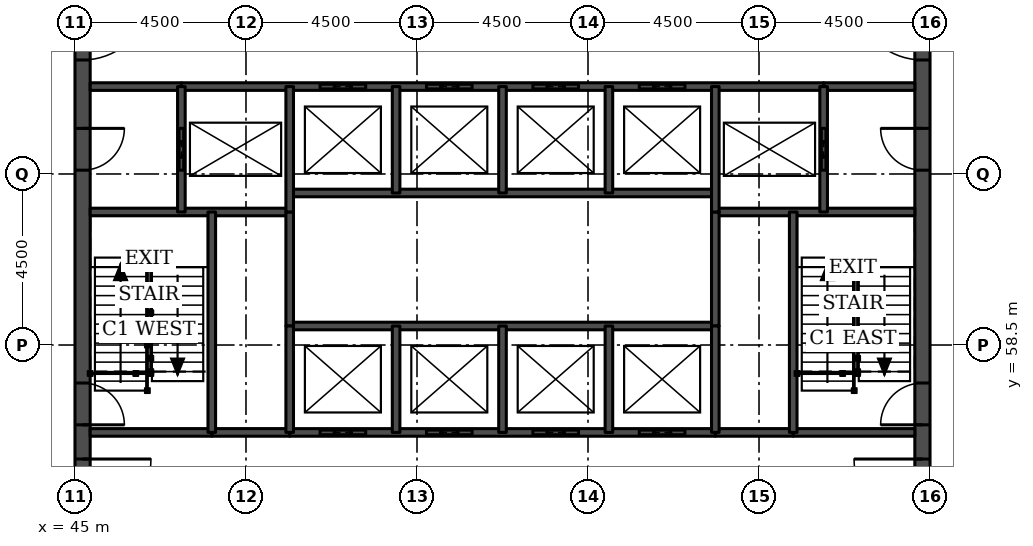
"""IFC4 building model, lengths in metres.
Left out: names, types, materials, properties, quantities, classifications, styles, units other than length and angle.
Written with IfcOpenShell. Run it as: python <this file> out.ifc"""

import sys

from ifc_helpers import new_model, si_unit, direction, frame, frame_2d, origin, place, context, subcontext, project, spatial, rectangle, extrude, element, fill, save


model = new_model("IFC4")
c1 = context("Model", 3, precision=1e-05, world=origin(), true_north=direction((0.0, 1.0)))
c2 = subcontext(c1, "Body", "Model", "MODEL_VIEW")
j1 = project(units=[si_unit("LENGTHUNIT", "METRE"), si_unit("PLANEANGLEUNIT", "RADIAN")], contexts=[c1])
p1 = place(None, origin())
s1 = spatial("IfcSite", under=j1, at=p1, CompositionType="ELEMENT")
p2 = place(p1, origin())
s2 = spatial("IfcBuilding", under=s1, at=p2, CompositionType="ELEMENT")
p3 = place(p2, frame((0.0, 0.0, 248.9)))
s3 = spatial("IfcBuildingStorey", under=s2, at=p3, CompositionType="ELEMENT", Elevation=248.9)
p4 = place(p3, frame((45.2, 49.5, 0.0), z_axis=(0.0, 0.0, 1.0), x_axis=(0.0, 1.0, 0.0)))
e1 = element("IfcWall", 1, at=p4, inside=s3, PredefinedType="SHEAR", context=c2, shape_type="SweptSolid", body=[
    extrude(rectangle(XDim=22.5, YDim=0.4, at=frame_2d((11.25, 0.0))), origin(), (0.0, 0.0, 1.0), 3.7),
])
p5 = place(p4, frame((4.2, 0.0, 0.0)))
e2 = element("IfcOpeningElement", 2, at=p5, cuts=e1, PredefinedType="OPENING", context=c2, shape_type="SweptSolid", body=[
    extrude(rectangle(XDim=1.8, YDim=2.1, at=frame_2d((0.9, 1.05))), frame((0.0, 0.21, 0.0), z_axis=(0.0, -1.0, 0.0), x_axis=(1.0, 0.0, 0.0)), (0.0, 0.0, 1.0), 0.42),
])
p6 = place(p4, frame((6.9, 0.0, 0.0)))
e3 = element("IfcOpeningElement", 3, at=p6, cuts=e1, PredefinedType="OPENING", context=c2, shape_type="SweptSolid", body=[
    extrude(rectangle(XDim=1.1, YDim=2.1, at=frame_2d((0.55, 1.05))), frame((0.0, 0.21, 0.0), z_axis=(0.0, -1.0, 0.0), x_axis=(1.0, 0.0, 0.0)), (0.0, 0.0, 1.0), 0.42),
])
p7 = place(p4, frame((13.6, 0.0, 0.0)))
e4 = element("IfcOpeningElement", 4, at=p7, cuts=e1, PredefinedType="OPENING", context=c2, shape_type="SweptSolid", body=[
    extrude(rectangle(XDim=1.1, YDim=2.1, at=frame_2d((0.55, 1.05))), frame((0.0, 0.21, 0.0), z_axis=(0.0, -1.0, 0.0), x_axis=(1.0, 0.0, 0.0)), (0.0, 0.0, 1.0), 0.42),
])
p8 = place(p4, frame((16.5, 0.0, 0.0)))
e5 = element("IfcOpeningElement", 5, at=p8, cuts=e1, PredefinedType="OPENING", context=c2, shape_type="SweptSolid", body=[
    extrude(rectangle(XDim=1.8, YDim=2.1, at=frame_2d((0.9, 1.05))), frame((0.0, 0.21, 0.0), z_axis=(0.0, -1.0, 0.0), x_axis=(1.0, 0.0, 0.0)), (0.0, 0.0, 1.0), 0.42),
])
p9 = place(p3, frame((67.3, 49.5, 0.0), z_axis=(0.0, 0.0, 1.0), x_axis=(0.0, 1.0, 0.0)))
e6 = element("IfcWall", 6, at=p9, inside=s3, PredefinedType="SHEAR", context=c2, shape_type="SweptSolid", body=[
    extrude(rectangle(XDim=22.5, YDim=0.4, at=frame_2d((11.25, 0.0))), origin(), (0.0, 0.0, 1.0), 3.7),
])
p10 = place(p9, frame((4.2, 0.0, 0.0)))
e7 = element("IfcOpeningElement", 7, at=p10, cuts=e6, PredefinedType="OPENING", context=c2, shape_type="SweptSolid", body=[
    extrude(rectangle(XDim=1.8, YDim=2.1, at=frame_2d((0.9, 1.05))), frame((0.0, 0.21, 0.0), z_axis=(0.0, -1.0, 0.0), x_axis=(1.0, 0.0, 0.0)), (0.0, 0.0, 1.0), 0.42),
])
p11 = place(p9, frame((6.9, 0.0, 0.0)))
e8 = element("IfcOpeningElement", 8, at=p11, cuts=e6, PredefinedType="OPENING", context=c2, shape_type="SweptSolid", body=[
    extrude(rectangle(XDim=1.1, YDim=2.1, at=frame_2d((0.55, 1.05))), frame((0.0, 0.21, 0.0), z_axis=(0.0, -1.0, 0.0), x_axis=(1.0, 0.0, 0.0)), (0.0, 0.0, 1.0), 0.42),
])
p12 = place(p9, frame((13.6, 0.0, 0.0)))
e9 = element("IfcOpeningElement", 9, at=p12, cuts=e6, PredefinedType="OPENING", context=c2, shape_type="SweptSolid", body=[
    extrude(rectangle(XDim=1.1, YDim=2.1, at=frame_2d((0.55, 1.05))), frame((0.0, 0.21, 0.0), z_axis=(0.0, -1.0, 0.0), x_axis=(1.0, 0.0, 0.0)), (0.0, 0.0, 1.0), 0.42),
])
p13 = place(p9, frame((16.5, 0.0, 0.0)))
e10 = element("IfcOpeningElement", 10, at=p13, cuts=e6, PredefinedType="OPENING", context=c2, shape_type="SweptSolid", body=[
    extrude(rectangle(XDim=1.8, YDim=2.1, at=frame_2d((0.9, 1.05))), frame((0.0, 0.21, 0.0), z_axis=(0.0, -1.0, 0.0), x_axis=(1.0, 0.0, 0.0)), (0.0, 0.0, 1.0), 0.42),
])
for number, where, z_axis, x_axis in (
    (11, (48.6, 56.2, 0.0), (0.0, 0.0, 1.0), (1.0, 0.0, 0.0)),
    (12, (61.85, 56.2, 0.0), (0.0, 0.0, 1.0), (1.0, 0.0, 0.0)),
):
    element("IfcWall", number, at=place(p3, frame(where, z_axis=z_axis, x_axis=x_axis)), inside=s3, PredefinedType="SOLIDWALL", context=c2, shape_type="SweptSolid", body=[
        extrude(rectangle(XDim=2.05, YDim=0.2, at=frame_2d((1.025, 0.0))), origin(), (0.0, 0.0, 1.0), 3.55),
    ])
p14 = place(p3, frame((45.4, 56.2, 0.0), z_axis=(0.0, 0.0, 1.0), x_axis=(1.0, 0.0, 0.0)))
e13 = element("IfcWall", 13, at=p14, inside=s3, PredefinedType="SOLIDWALL", context=c2, shape_type="SweptSolid", body=[
    extrude(rectangle(XDim=3.2, YDim=0.2, at=frame_2d((1.6, 0.0))), origin(), (0.0, 0.0, 1.0), 3.55),
])
p15 = place(p3, frame((50.65, 56.2, 0.0), z_axis=(0.0, 0.0, 1.0), x_axis=(1.0, 0.0, 0.0)))
e14 = element("IfcWall", 14, at=p15, inside=s3, PredefinedType="SOLIDWALL", context=c2, shape_type="SweptSolid", body=[
    extrude(rectangle(XDim=11.2, YDim=0.2, at=frame_2d((5.6, 0.0))), origin(), (0.0, 0.0, 1.0), 3.55),
])
p16 = place(p15, frame((0.8, 0.0, 0.0)))
e15 = element("IfcOpeningElement", 15, at=p16, cuts=e14, PredefinedType="OPENING", context=c2, shape_type="SweptSolid", body=[
    extrude(rectangle(XDim=1.2, YDim=2.1, at=frame_2d((0.6, 1.05))), frame((0.0, 0.11, 0.0), z_axis=(0.0, -1.0, 0.0), x_axis=(1.0, 0.0, 0.0)), (0.0, 0.0, 1.0), 0.22),
])
p17 = place(p15, frame((3.6, 0.0, 0.0)))
e16 = element("IfcOpeningElement", 16, at=p17, cuts=e14, PredefinedType="OPENING", context=c2, shape_type="SweptSolid", body=[
    extrude(rectangle(XDim=1.2, YDim=2.1, at=frame_2d((0.6, 1.05))), frame((0.0, 0.11, 0.0), z_axis=(0.0, -1.0, 0.0), x_axis=(1.0, 0.0, 0.0)), (0.0, 0.0, 1.0), 0.22),
])
p18 = place(p15, frame((6.4, 0.0, 0.0)))
e17 = element("IfcOpeningElement", 17, at=p18, cuts=e14, PredefinedType="OPENING", context=c2, shape_type="SweptSolid", body=[
    extrude(rectangle(XDim=1.2, YDim=2.1, at=frame_2d((0.6, 1.05))), frame((0.0, 0.11, 0.0), z_axis=(0.0, -1.0, 0.0), x_axis=(1.0, 0.0, 0.0)), (0.0, 0.0, 1.0), 0.22),
])
p19 = place(p15, frame((9.2, 0.0, 0.0)))
e18 = element("IfcOpeningElement", 18, at=p19, cuts=e14, PredefinedType="OPENING", context=c2, shape_type="SweptSolid", body=[
    extrude(rectangle(XDim=1.2, YDim=2.1, at=frame_2d((0.6, 1.05))), frame((0.0, 0.11, 0.0), z_axis=(0.0, -1.0, 0.0), x_axis=(1.0, 0.0, 0.0)), (0.0, 0.0, 1.0), 0.22),
])
p20 = place(p3, frame((63.9, 56.2, 0.0), z_axis=(0.0, 0.0, 1.0), x_axis=(1.0, 0.0, 0.0)))
e19 = element("IfcWall", 19, at=p20, inside=s3, PredefinedType="SOLIDWALL", context=c2, shape_type="SweptSolid", body=[
    extrude(rectangle(XDim=3.2, YDim=0.2, at=frame_2d((1.6, 0.0))), origin(), (0.0, 0.0, 1.0), 3.55),
])
p21 = place(p3, frame((50.65, 59.0, 0.0), z_axis=(0.0, 0.0, 1.0), x_axis=(1.0, 0.0, 0.0)))
e20 = element("IfcWall", 20, at=p21, inside=s3, PredefinedType="SOLIDWALL", context=c2, shape_type="SweptSolid", body=[
    extrude(rectangle(XDim=11.2, YDim=0.2, at=frame_2d((5.6, 0.0))), origin(), (0.0, 0.0, 1.0), 3.7),
])
for number, where, z_axis, x_axis in (
    (21, (45.4, 62.0, 0.0), (0.0, 0.0, 1.0), (1.0, 0.0, 0.0)),
    (22, (61.85, 62.0, 0.0), (0.0, 0.0, 1.0), (1.0, 0.0, 0.0)),
):
    element("IfcWall", number, at=place(p3, frame(where, z_axis=z_axis, x_axis=x_axis)), inside=s3, PredefinedType="SOLIDWALL", context=c2, shape_type="SweptSolid", body=[
        extrude(rectangle(XDim=5.25, YDim=0.2, at=frame_2d((2.625, 0.0))), origin(), (0.0, 0.0, 1.0), 3.55),
    ])
p22 = place(p3, frame((50.65, 62.5, 0.0), z_axis=(0.0, 0.0, 1.0), x_axis=(1.0, 0.0, 0.0)))
e23 = element("IfcWall", 23, at=p22, inside=s3, PredefinedType="SOLIDWALL", context=c2, shape_type="SweptSolid", body=[
    extrude(rectangle(XDim=11.2, YDim=0.2, at=frame_2d((5.6, 0.0))), origin(), (0.0, 0.0, 1.0), 3.7),
])
for number, where, z_axis, x_axis in (
    (24, (45.4, 65.3, 0.0), (0.0, 0.0, 1.0), (1.0, 0.0, 0.0)),
    (25, (64.7, 65.3, 0.0), (0.0, 0.0, 1.0), (1.0, 0.0, 0.0)),
):
    element("IfcWall", number, at=place(p3, frame(where, z_axis=z_axis, x_axis=x_axis)), inside=s3, PredefinedType="SOLIDWALL", context=c2, shape_type="SweptSolid", body=[
        extrude(rectangle(XDim=2.4, YDim=0.2, at=frame_2d((1.2, 0.0))), origin(), (0.0, 0.0, 1.0), 3.55),
    ])
p23 = place(p3, frame((47.8, 65.3, 0.0), z_axis=(0.0, 0.0, 1.0), x_axis=(1.0, 0.0, 0.0)))
e26 = element("IfcWall", 26, at=p23, inside=s3, PredefinedType="SOLIDWALL", context=c2, shape_type="SweptSolid", body=[
    extrude(rectangle(XDim=16.9, YDim=0.2, at=frame_2d((8.45, 0.0))), origin(), (0.0, 0.0, 1.0), 3.55),
])
p24 = place(p23, frame((3.65, 0.0, 0.0)))
e27 = element("IfcOpeningElement", 27, at=p24, cuts=e26, PredefinedType="OPENING", context=c2, shape_type="SweptSolid", body=[
    extrude(rectangle(XDim=1.2, YDim=2.1, at=frame_2d((0.6, 1.05))), frame((0.0, 0.11, 0.0), z_axis=(0.0, -1.0, 0.0), x_axis=(1.0, 0.0, 0.0)), (0.0, 0.0, 1.0), 0.22),
])
p25 = place(p23, frame((6.45, 0.0, 0.0)))
e28 = element("IfcOpeningElement", 28, at=p25, cuts=e26, PredefinedType="OPENING", context=c2, shape_type="SweptSolid", body=[
    extrude(rectangle(XDim=1.2, YDim=2.1, at=frame_2d((0.6, 1.05))), frame((0.0, 0.11, 0.0), z_axis=(0.0, -1.0, 0.0), x_axis=(1.0, 0.0, 0.0)), (0.0, 0.0, 1.0), 0.22),
])
p26 = place(p23, frame((9.25, 0.0, 0.0)))
e29 = element("IfcOpeningElement", 29, at=p26, cuts=e26, PredefinedType="OPENING", context=c2, shape_type="SweptSolid", body=[
    extrude(rectangle(XDim=1.2, YDim=2.1, at=frame_2d((0.6, 1.05))), frame((0.0, 0.11, 0.0), z_axis=(0.0, -1.0, 0.0), x_axis=(1.0, 0.0, 0.0)), (0.0, 0.0, 1.0), 0.22),
])
p27 = place(p23, frame((12.05, 0.0, 0.0)))
e30 = element("IfcOpeningElement", 30, at=p27, cuts=e26, PredefinedType="OPENING", context=c2, shape_type="SweptSolid", body=[
    extrude(rectangle(XDim=1.2, YDim=2.1, at=frame_2d((0.6, 1.05))), frame((0.0, 0.11, 0.0), z_axis=(0.0, -1.0, 0.0), x_axis=(1.0, 0.0, 0.0)), (0.0, 0.0, 1.0), 0.22),
])
p28 = place(p3, frame((47.8, 62.0, 0.0), z_axis=(0.0, 0.0, 1.0), x_axis=(0.0, 1.0, 0.0)))
e31 = element("IfcWall", 31, at=p28, inside=s3, PredefinedType="SOLIDWALL", context=c2, shape_type="SweptSolid", body=[
    extrude(rectangle(XDim=3.3, YDim=0.2, at=frame_2d((1.65, 0.0))), origin(), (0.0, 0.0, 1.0), 3.55),
])
p29 = place(p28, frame((1.1, 0.0, 0.0)))
e32 = element("IfcOpeningElement", 32, at=p29, cuts=e31, PredefinedType="OPENING", context=c2, shape_type="SweptSolid", body=[
    extrude(rectangle(XDim=1.1, YDim=2.1, at=frame_2d((0.55, 1.05))), frame((0.0, 0.11, 0.0), z_axis=(0.0, -1.0, 0.0), x_axis=(1.0, 0.0, 0.0)), (0.0, 0.0, 1.0), 0.22),
])
p30 = place(p3, frame((48.6, 56.2, 0.0), z_axis=(0.0, 0.0, 1.0), x_axis=(0.0, 1.0, 0.0)))
e33 = element("IfcWall", 33, at=p30, inside=s3, PredefinedType="SOLIDWALL", context=c2, shape_type="SweptSolid", body=[
    extrude(rectangle(XDim=5.8, YDim=0.2, at=frame_2d((2.9, 0.0))), origin(), (0.0, 0.0, 1.0), 3.55),
])
p31 = place(p3, frame((50.65, 59.0, 0.0), z_axis=(0.0, 0.0, 1.0), x_axis=(0.0, 1.0, 0.0)))
e34 = element("IfcWall", 34, at=p31, inside=s3, PredefinedType="SOLIDWALL", context=c2, shape_type="SweptSolid", body=[
    extrude(rectangle(XDim=3.0, YDim=0.2, at=frame_2d((1.5, 0.0))), origin(), (0.0, 0.0, 1.0), 3.7),
])
p32 = place(p3, frame((50.65, 56.2, 0.0), z_axis=(0.0, 0.0, 1.0), x_axis=(0.0, 1.0, 0.0)))
e35 = element("IfcWall", 35, at=p32, inside=s3, PredefinedType="SOLIDWALL", context=c2, shape_type="SweptSolid", body=[
    extrude(rectangle(XDim=2.8, YDim=0.2, at=frame_2d((1.4, 0.0))), origin(), (0.0, 0.0, 1.0), 3.55),
])
p33 = place(p3, frame((50.65, 62.0, 0.0), z_axis=(0.0, 0.0, 1.0), x_axis=(0.0, 1.0, 0.0)))
e36 = element("IfcWall", 36, at=p33, inside=s3, PredefinedType="SOLIDWALL", context=c2, shape_type="SweptSolid", body=[
    extrude(rectangle(XDim=3.3, YDim=0.2, at=frame_2d((1.65, 0.0))), origin(), (0.0, 0.0, 1.0), 3.55),
])
for number, where, z_axis, x_axis in (
    (37, (53.45, 56.2, 0.0), (0.0, 0.0, 1.0), (0.0, 1.0, 0.0)),
    (38, (53.45, 62.5, 0.0), (0.0, 0.0, 1.0), (0.0, 1.0, 0.0)),
    (39, (56.25, 56.2, 0.0), (0.0, 0.0, 1.0), (0.0, 1.0, 0.0)),
    (40, (56.25, 62.5, 0.0), (0.0, 0.0, 1.0), (0.0, 1.0, 0.0)),
    (41, (59.05, 56.2, 0.0), (0.0, 0.0, 1.0), (0.0, 1.0, 0.0)),
    (42, (59.05, 62.5, 0.0), (0.0, 0.0, 1.0), (0.0, 1.0, 0.0)),
):
    element("IfcWall", number, at=place(p3, frame(where, z_axis=z_axis, x_axis=x_axis)), inside=s3, PredefinedType="SOLIDWALL", context=c2, shape_type="SweptSolid", body=[
        extrude(rectangle(XDim=2.8, YDim=0.2, at=frame_2d((1.4, 0.0))), origin(), (0.0, 0.0, 1.0), 3.55),
    ])
p34 = place(p3, frame((61.85, 59.0, 0.0), z_axis=(0.0, 0.0, 1.0), x_axis=(0.0, 1.0, 0.0)))
e43 = element("IfcWall", 43, at=p34, inside=s3, PredefinedType="SOLIDWALL", context=c2, shape_type="SweptSolid", body=[
    extrude(rectangle(XDim=3.0, YDim=0.2, at=frame_2d((1.5, 0.0))), origin(), (0.0, 0.0, 1.0), 3.7),
])
p35 = place(p3, frame((61.85, 56.2, 0.0), z_axis=(0.0, 0.0, 1.0), x_axis=(0.0, 1.0, 0.0)))
e44 = element("IfcWall", 44, at=p35, inside=s3, PredefinedType="SOLIDWALL", context=c2, shape_type="SweptSolid", body=[
    extrude(rectangle(XDim=2.8, YDim=0.2, at=frame_2d((1.4, 0.0))), origin(), (0.0, 0.0, 1.0), 3.55),
])
p36 = place(p3, frame((61.85, 62.0, 0.0), z_axis=(0.0, 0.0, 1.0), x_axis=(0.0, 1.0, 0.0)))
e45 = element("IfcWall", 45, at=p36, inside=s3, PredefinedType="SOLIDWALL", context=c2, shape_type="SweptSolid", body=[
    extrude(rectangle(XDim=3.3, YDim=0.2, at=frame_2d((1.65, 0.0))), origin(), (0.0, 0.0, 1.0), 3.55),
])
p37 = place(p3, frame((63.9, 56.2, 0.0), z_axis=(0.0, 0.0, 1.0), x_axis=(0.0, 1.0, 0.0)))
e46 = element("IfcWall", 46, at=p37, inside=s3, PredefinedType="SOLIDWALL", context=c2, shape_type="SweptSolid", body=[
    extrude(rectangle(XDim=5.8, YDim=0.2, at=frame_2d((2.9, 0.0))), origin(), (0.0, 0.0, 1.0), 3.55),
])
p38 = place(p3, frame((64.7, 62.0, 0.0), z_axis=(0.0, 0.0, 1.0), x_axis=(0.0, 1.0, 0.0)))
e47 = element("IfcWall", 47, at=p38, inside=s3, PredefinedType="SOLIDWALL", context=c2, shape_type="SweptSolid", body=[
    extrude(rectangle(XDim=3.3, YDim=0.2, at=frame_2d((1.65, 0.0))), origin(), (0.0, 0.0, 1.0), 3.55),
])
p39 = place(p38, frame((1.1, 0.0, 0.0)))
e48 = element("IfcOpeningElement", 48, at=p39, cuts=e47, PredefinedType="OPENING", context=c2, shape_type="SweptSolid", body=[
    extrude(rectangle(XDim=1.1, YDim=2.1, at=frame_2d((0.55, 1.05))), frame((0.0, 0.11, 0.0), z_axis=(0.0, -1.0, 0.0), x_axis=(1.0, 0.0, 0.0)), (0.0, 0.0, 1.0), 0.22),
])
p40 = place(p16, origin())
e49 = element("IfcDoor", 49, at=p40, inside=s3, OperationType="DOUBLE_DOOR_SLIDING", PredefinedType="DOOR", context=c2, shape_type="SweptSolid", body=[
    extrude(rectangle(XDim=1.2, YDim=2.1, at=frame_2d((0.6, 1.05))), frame((0.0, 0.025, 0.0), z_axis=(0.0, -1.0, 0.0), x_axis=(1.0, 0.0, 0.0)), (0.0, 0.0, 1.0), 0.05),
])
fill(e15, e49)
p41 = place(p17, origin())
e50 = element("IfcDoor", 50, at=p41, inside=s3, OperationType="DOUBLE_DOOR_SLIDING", PredefinedType="DOOR", context=c2, shape_type="SweptSolid", body=[
    extrude(rectangle(XDim=1.2, YDim=2.1, at=frame_2d((0.6, 1.05))), frame((0.0, 0.025, 0.0), z_axis=(0.0, -1.0, 0.0), x_axis=(1.0, 0.0, 0.0)), (0.0, 0.0, 1.0), 0.05),
])
fill(e16, e50)
p42 = place(p18, origin())
e51 = element("IfcDoor", 51, at=p42, inside=s3, OperationType="DOUBLE_DOOR_SLIDING", PredefinedType="DOOR", context=c2, shape_type="SweptSolid", body=[
    extrude(rectangle(XDim=1.2, YDim=2.1, at=frame_2d((0.6, 1.05))), frame((0.0, 0.025, 0.0), z_axis=(0.0, -1.0, 0.0), x_axis=(1.0, 0.0, 0.0)), (0.0, 0.0, 1.0), 0.05),
])
fill(e17, e51)
p43 = place(p19, origin())
e52 = element("IfcDoor", 52, at=p43, inside=s3, OperationType="DOUBLE_DOOR_SLIDING", PredefinedType="DOOR", context=c2, shape_type="SweptSolid", body=[
    extrude(rectangle(XDim=1.2, YDim=2.1, at=frame_2d((0.6, 1.05))), frame((0.0, 0.025, 0.0), z_axis=(0.0, -1.0, 0.0), x_axis=(1.0, 0.0, 0.0)), (0.0, 0.0, 1.0), 0.05),
])
fill(e18, e52)
p44 = place(p24, origin())
e53 = element("IfcDoor", 53, at=p44, inside=s3, OperationType="DOUBLE_DOOR_SLIDING", PredefinedType="DOOR", context=c2, shape_type="SweptSolid", body=[
    extrude(rectangle(XDim=1.2, YDim=2.1, at=frame_2d((0.6, 1.05))), frame((0.0, 0.025, 0.0), z_axis=(0.0, -1.0, 0.0), x_axis=(1.0, 0.0, 0.0)), (0.0, 0.0, 1.0), 0.05),
])
fill(e27, e53)
p45 = place(p25, origin())
e54 = element("IfcDoor", 54, at=p45, inside=s3, OperationType="DOUBLE_DOOR_SLIDING", PredefinedType="DOOR", context=c2, shape_type="SweptSolid", body=[
    extrude(rectangle(XDim=1.2, YDim=2.1, at=frame_2d((0.6, 1.05))), frame((0.0, 0.025, 0.0), z_axis=(0.0, -1.0, 0.0), x_axis=(1.0, 0.0, 0.0)), (0.0, 0.0, 1.0), 0.05),
])
fill(e28, e54)
p46 = place(p26, origin())
e55 = element("IfcDoor", 55, at=p46, inside=s3, OperationType="DOUBLE_DOOR_SLIDING", PredefinedType="DOOR", context=c2, shape_type="SweptSolid", body=[
    extrude(rectangle(XDim=1.2, YDim=2.1, at=frame_2d((0.6, 1.05))), frame((0.0, 0.025, 0.0), z_axis=(0.0, -1.0, 0.0), x_axis=(1.0, 0.0, 0.0)), (0.0, 0.0, 1.0), 0.05),
])
fill(e29, e55)
p47 = place(p27, origin())
e56 = element("IfcDoor", 56, at=p47, inside=s3, OperationType="DOUBLE_DOOR_SLIDING", PredefinedType="DOOR", context=c2, shape_type="SweptSolid", body=[
    extrude(rectangle(XDim=1.2, YDim=2.1, at=frame_2d((0.6, 1.05))), frame((0.0, 0.025, 0.0), z_axis=(0.0, -1.0, 0.0), x_axis=(1.0, 0.0, 0.0)), (0.0, 0.0, 1.0), 0.05),
])
fill(e30, e56)
p48 = place(p29, origin())
e57 = element("IfcDoor", 57, at=p48, inside=s3, OperationType="DOUBLE_DOOR_SLIDING", PredefinedType="DOOR", context=c2, shape_type="SweptSolid", body=[
    extrude(rectangle(XDim=1.1, YDim=2.1, at=frame_2d((0.55, 1.05))), frame((0.0, 0.025, 0.0), z_axis=(0.0, -1.0, 0.0), x_axis=(1.0, 0.0, 0.0)), (0.0, 0.0, 1.0), 0.05),
])
fill(e32, e57)
p49 = place(p39, origin())
e58 = element("IfcDoor", 58, at=p49, inside=s3, OperationType="DOUBLE_DOOR_SLIDING", PredefinedType="DOOR", context=c2, shape_type="SweptSolid", body=[
    extrude(rectangle(XDim=1.1, YDim=2.1, at=frame_2d((0.55, 1.05))), frame((0.0, 0.025, 0.0), z_axis=(0.0, -1.0, 0.0), x_axis=(1.0, 0.0, 0.0)), (0.0, 0.0, 1.0), 0.05),
])
fill(e48, e58)
p50 = place(p5, frame((1.8, 0.0, 0.0), z_axis=(0.0, 0.0, 1.0), x_axis=(-1.0, 0.0, 0.0)))
e59 = element("IfcDoor", 59, at=p50, inside=s3, OperationType="SINGLE_SWING_LEFT", PredefinedType="DOOR", context=c2, shape_type="SweptSolid", body=[
    extrude(rectangle(XDim=1.8, YDim=2.1, at=frame_2d((0.9, 1.05))), frame((0.0, 0.025, 0.0), z_axis=(0.0, -1.0, 0.0), x_axis=(1.0, 0.0, 0.0)), (0.0, 0.0, 1.0), 0.05),
])
fill(e2, e59)
p51 = place(p6, frame((1.1, 0.0, 0.0), z_axis=(0.0, 0.0, 1.0), x_axis=(-1.0, 0.0, 0.0)))
e60 = element("IfcDoor", 60, at=p51, inside=s3, OperationType="SINGLE_SWING_RIGHT", PredefinedType="DOOR", context=c2, shape_type="SweptSolid", body=[
    extrude(rectangle(XDim=1.1, YDim=2.1, at=frame_2d((0.55, 1.05))), frame((0.0, 0.025, 0.0), z_axis=(0.0, -1.0, 0.0), x_axis=(1.0, 0.0, 0.0)), (0.0, 0.0, 1.0), 0.05),
])
fill(e3, e60)
p52 = place(p7, frame((1.1, 0.0, 0.0), z_axis=(0.0, 0.0, 1.0), x_axis=(-1.0, 0.0, 0.0)))
e61 = element("IfcDoor", 61, at=p52, inside=s3, OperationType="SINGLE_SWING_LEFT", PredefinedType="DOOR", context=c2, shape_type="SweptSolid", body=[
    extrude(rectangle(XDim=1.1, YDim=2.1, at=frame_2d((0.55, 1.05))), frame((0.0, 0.025, 0.0), z_axis=(0.0, -1.0, 0.0), x_axis=(1.0, 0.0, 0.0)), (0.0, 0.0, 1.0), 0.05),
])
fill(e4, e61)
p53 = place(p8, frame((1.8, 0.0, 0.0), z_axis=(0.0, 0.0, 1.0), x_axis=(-1.0, 0.0, 0.0)))
e62 = element("IfcDoor", 62, at=p53, inside=s3, OperationType="SINGLE_SWING_LEFT", PredefinedType="DOOR", context=c2, shape_type="SweptSolid", body=[
    extrude(rectangle(XDim=1.8, YDim=2.1, at=frame_2d((0.9, 1.05))), frame((0.0, 0.025, 0.0), z_axis=(0.0, -1.0, 0.0), x_axis=(1.0, 0.0, 0.0)), (0.0, 0.0, 1.0), 0.05),
])
fill(e5, e62)
p54 = place(p10, origin())
e63 = element("IfcDoor", 63, at=p54, inside=s3, OperationType="SINGLE_SWING_RIGHT", PredefinedType="DOOR", context=c2, shape_type="SweptSolid", body=[
    extrude(rectangle(XDim=1.8, YDim=2.1, at=frame_2d((0.9, 1.05))), frame((0.0, 0.025, 0.0), z_axis=(0.0, -1.0, 0.0), x_axis=(1.0, 0.0, 0.0)), (0.0, 0.0, 1.0), 0.05),
])
fill(e7, e63)
p55 = place(p11, origin())
e64 = element("IfcDoor", 64, at=p55, inside=s3, OperationType="SINGLE_SWING_LEFT", PredefinedType="DOOR", context=c2, shape_type="SweptSolid", body=[
    extrude(rectangle(XDim=1.1, YDim=2.1, at=frame_2d((0.55, 1.05))), frame((0.0, 0.025, 0.0), z_axis=(0.0, -1.0, 0.0), x_axis=(1.0, 0.0, 0.0)), (0.0, 0.0, 1.0), 0.05),
])
fill(e8, e64)
p56 = place(p12, origin())
e65 = element("IfcDoor", 65, at=p56, inside=s3, OperationType="SINGLE_SWING_RIGHT", PredefinedType="DOOR", context=c2, shape_type="SweptSolid", body=[
    extrude(rectangle(XDim=1.1, YDim=2.1, at=frame_2d((0.55, 1.05))), frame((0.0, 0.025, 0.0), z_axis=(0.0, -1.0, 0.0), x_axis=(1.0, 0.0, 0.0)), (0.0, 0.0, 1.0), 0.05),
])
fill(e9, e65)
p57 = place(p13, origin())
e66 = element("IfcDoor", 66, at=p57, inside=s3, OperationType="SINGLE_SWING_RIGHT", PredefinedType="DOOR", context=c2, shape_type="SweptSolid", body=[
    extrude(rectangle(XDim=1.8, YDim=2.1, at=frame_2d((0.9, 1.05))), frame((0.0, 0.025, 0.0), z_axis=(0.0, -1.0, 0.0), x_axis=(1.0, 0.0, 0.0)), (0.0, 0.0, 1.0), 0.05),
])
fill(e10, e66)
save(model, sys.argv[1])
